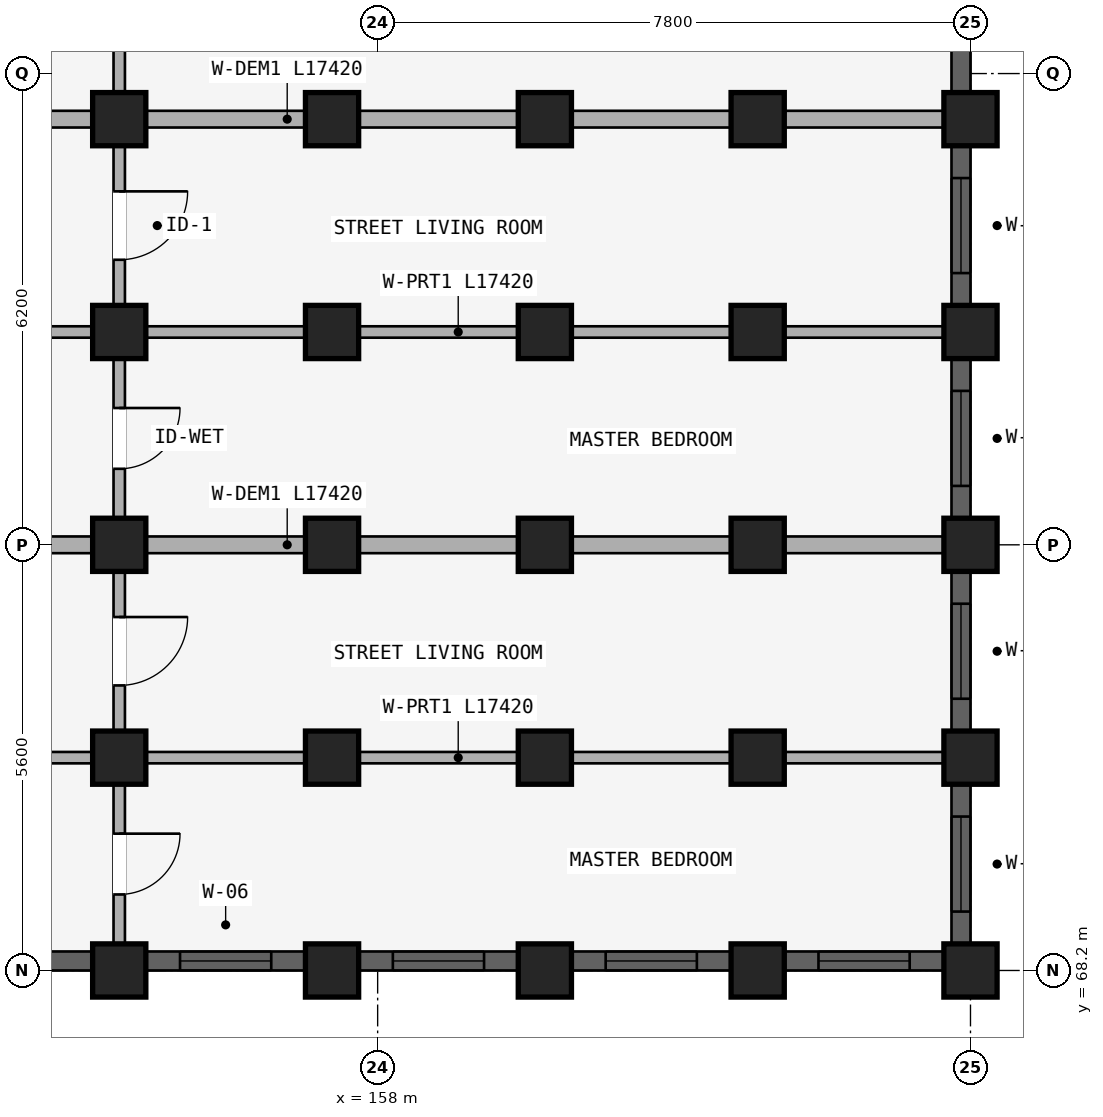
"""IFC4 building model, lengths in metres.
Left out: names, types, materials, properties, quantities, classifications, styles, units other than length and angle.
Written with IfcOpenShell. Run it as: python <this file> out.ifc"""

import sys

from ifc_helpers import new_model, si_unit, direction, frame, frame_2d, origin, origin_2d, place, context, subcontext, project, spatial, rectangle, extrude, element, fill, save


model = new_model("IFC4")
c1 = context("Model", 3, precision=1e-05, world=origin(), true_north=direction((0.0, 1.0)))
c2 = subcontext(c1, "Body", "Model", "MODEL_VIEW")
j1 = project(units=[si_unit("LENGTHUNIT", "METRE"), si_unit("PLANEANGLEUNIT", "RADIAN")], contexts=[c1])
p1 = place(None, origin())
s1 = spatial("IfcSite", under=j1, at=p1, CompositionType="ELEMENT")
p2 = place(p1, origin())
s2 = spatial("IfcBuilding", under=s1, at=p2, CompositionType="ELEMENT")
p3 = place(p2, frame((0.0, 0.0, 24.45)))
s3 = spatial("IfcBuildingStorey", under=s2, at=p3, CompositionType="ELEMENT", Elevation=24.45)
for number, where, z_axis, x_axis in (
    (1, (154.6, 79.4, 0.0), (0.0, 0.0, 1.0), (1.0, 0.0, 0.0)),
    (2, (157.4, 79.4, 0.0), (0.0, 0.0, 1.0), (1.0, 0.0, 0.0)),
    (3, (160.2, 79.4, 0.0), (0.0, 0.0, 1.0), (1.0, 0.0, 0.0)),
    (4, (163.0, 79.4, 0.0), (0.0, 0.0, 1.0), (1.0, 0.0, 0.0)),
    (5, (165.8, 79.4, 0.0), (0.0, 0.0, 1.0), (1.0, 0.0, 0.0)),
    (6, (154.6, 76.6, 0.0), (0.0, 0.0, 1.0), (1.0, 0.0, 0.0)),
    (7, (157.4, 76.6, 0.0), (0.0, 0.0, 1.0), (1.0, 0.0, 0.0)),
    (8, (160.2, 76.6, 0.0), (0.0, 0.0, 1.0), (1.0, 0.0, 0.0)),
    (9, (163.0, 76.6, 0.0), (0.0, 0.0, 1.0), (1.0, 0.0, 0.0)),
    (10, (165.8, 76.6, 0.0), (0.0, 0.0, 1.0), (1.0, 0.0, 0.0)),
    (11, (154.6, 73.8, 0.0), (0.0, 0.0, 1.0), (1.0, 0.0, 0.0)),
    (12, (157.4, 73.8, 0.0), (0.0, 0.0, 1.0), (1.0, 0.0, 0.0)),
    (13, (160.2, 73.8, 0.0), (0.0, 0.0, 1.0), (1.0, 0.0, 0.0)),
    (14, (163.0, 73.8, 0.0), (0.0, 0.0, 1.0), (1.0, 0.0, 0.0)),
    (15, (165.8, 73.8, 0.0), (0.0, 0.0, 1.0), (1.0, 0.0, 0.0)),
    (16, (154.6, 71.0, 0.0), (0.0, 0.0, 1.0), (1.0, 0.0, 0.0)),
    (17, (157.4, 71.0, 0.0), (0.0, 0.0, 1.0), (1.0, 0.0, 0.0)),
    (18, (160.2, 71.0, 0.0), (0.0, 0.0, 1.0), (1.0, 0.0, 0.0)),
    (19, (163.0, 71.0, 0.0), (0.0, 0.0, 1.0), (1.0, 0.0, 0.0)),
    (20, (165.8, 71.0, 0.0), (0.0, 0.0, 1.0), (1.0, 0.0, 0.0)),
):
    element("IfcColumn", number, at=place(p3, frame(where, z_axis=z_axis, x_axis=x_axis)), inside=s3, PredefinedType="COLUMN", context=c2, shape_type="SweptSolid", body=[
        extrude(rectangle(XDim=0.7, YDim=0.7, at=origin_2d()), origin(), (0.0, 0.0, 1.0), 2.93),
    ])
for number, where, z_axis, x_axis in (
    (21, (154.6, 68.2, 0.0), (0.0, 0.0, 1.0), (1.0, 0.0, 0.0)),
    (22, (157.4, 68.2, 0.0), (0.0, 0.0, 1.0), (1.0, 0.0, 0.0)),
    (23, (160.2, 68.2, 0.0), (0.0, 0.0, 1.0), (1.0, 0.0, 0.0)),
    (24, (163.0, 68.2, 0.0), (0.0, 0.0, 1.0), (1.0, 0.0, 0.0)),
    (25, (165.8, 68.2, 0.0), (0.0, 0.0, 1.0), (1.0, 0.0, 0.0)),
):
    element("IfcColumn", number, at=place(p3, frame(where, z_axis=z_axis, x_axis=x_axis)), inside=s3, PredefinedType="COLUMN", context=c2, shape_type="SweptSolid", body=[
        extrude(rectangle(XDim=0.7, YDim=0.7, at=origin_2d()), origin(), (0.0, 0.0, 1.0), 2.97),
    ])
p4 = place(p3, frame((154.6, 83.52, 0.0), z_axis=(0.0, 0.0, 1.0), x_axis=(0.0, -1.0, 0.0)))
e26 = element("IfcWall", 26, at=p4, inside=s3, PredefinedType="PARTITIONING", context=c2, shape_type="SweptSolid", body=[
    extrude(rectangle(XDim=4.04, YDim=0.15, at=frame_2d((2.02, 0.0))), origin(), (0.0, 0.0, 1.0), 2.372),
])
p5 = place(p4, frame((1.57, 0.0, 0.0)))
e27 = element("IfcOpeningElement", 27, at=p5, cuts=e26, PredefinedType="OPENING", context=c2, shape_type="SweptSolid", body=[
    extrude(rectangle(XDim=0.9, YDim=2.1, at=frame_2d((0.45, 1.05))), frame((0.0, 0.085, 0.0), z_axis=(0.0, -1.0, 0.0), x_axis=(1.0, 0.0, 0.0)), (0.0, 0.0, 1.0), 0.17),
])
p6 = place(p3, frame((154.6, 79.32, 0.0), z_axis=(0.0, 0.0, 1.0), x_axis=(0.0, -1.0, 0.0)))
e28 = element("IfcWall", 28, at=p6, inside=s3, PredefinedType="PLUMBINGWALL", context=c2, shape_type="SweptSolid", body=[
    extrude(rectangle(XDim=2.64, YDim=0.15, at=frame_2d((1.32, 0.0))), origin(), (0.0, 0.0, 1.0), 2.372),
])
p7 = place(p6, frame((0.87, 0.0, 0.0)))
e29 = element("IfcOpeningElement", 29, at=p7, cuts=e28, PredefinedType="OPENING", context=c2, shape_type="SweptSolid", body=[
    extrude(rectangle(XDim=0.9, YDim=2.1, at=frame_2d((0.45, 1.05))), frame((0.0, 0.085, 0.0), z_axis=(0.0, -1.0, 0.0), x_axis=(1.0, 0.0, 0.0)), (0.0, 0.0, 1.0), 0.17),
])
p8 = place(p3, frame((148.1, 79.4, 0.0), z_axis=(0.0, 0.0, 1.0), x_axis=(1.0, 0.0, 0.0)))
e30 = element("IfcWall", 30, at=p8, inside=s3, PredefinedType="STANDARD", context=c2, shape_type="SweptSolid", body=[
    extrude(rectangle(XDim=17.42, YDim=0.22, at=frame_2d((8.71, 0.0))), origin(), (0.0, 0.0, 1.0), 2.372),
])
p9 = place(p3, frame((154.6, 76.52, 0.0), z_axis=(0.0, 0.0, 1.0), x_axis=(0.0, -1.0, 0.0)))
e31 = element("IfcWall", 31, at=p9, inside=s3, PredefinedType="PLUMBINGWALL", context=c2, shape_type="SweptSolid", body=[
    extrude(rectangle(XDim=2.64, YDim=0.15, at=frame_2d((1.32, 0.0))), origin(), (0.0, 0.0, 1.0), 2.372),
])
p10 = place(p9, frame((0.92, 0.0, 0.0)))
e32 = element("IfcOpeningElement", 32, at=p10, cuts=e31, PredefinedType="OPENING", context=c2, shape_type="SweptSolid", body=[
    extrude(rectangle(XDim=0.8, YDim=2.1, at=frame_2d((0.4, 1.05))), frame((0.0, 0.085, 0.0), z_axis=(0.0, -1.0, 0.0), x_axis=(1.0, 0.0, 0.0)), (0.0, 0.0, 1.0), 0.17),
])
p11 = place(p3, frame((148.1, 76.6, 0.0), z_axis=(0.0, 0.0, 1.0), x_axis=(1.0, 0.0, 0.0)))
e33 = element("IfcWall", 33, at=p11, inside=s3, PredefinedType="PARTITIONING", context=c2, shape_type="SweptSolid", body=[
    extrude(rectangle(XDim=17.42, YDim=0.15, at=frame_2d((8.71, 0.0))), origin(), (0.0, 0.0, 1.0), 2.372),
])
p12 = place(p11, frame((2.75, 0.0, 0.0)))
e34 = element("IfcOpeningElement", 34, at=p12, cuts=e33, PredefinedType="OPENING", context=c2, shape_type="SweptSolid", body=[
    extrude(rectangle(XDim=0.9, YDim=2.1, at=frame_2d((0.45, 1.05))), frame((0.0, 0.085, 0.0), z_axis=(0.0, -1.0, 0.0), x_axis=(1.0, 0.0, 0.0)), (0.0, 0.0, 1.0), 0.17),
])
p13 = place(p3, frame((154.6, 73.72, 0.0), z_axis=(0.0, 0.0, 1.0), x_axis=(0.0, -1.0, 0.0)))
e35 = element("IfcWall", 35, at=p13, inside=s3, PredefinedType="PLUMBINGWALL", context=c2, shape_type="SweptSolid", body=[
    extrude(rectangle(XDim=2.64, YDim=0.15, at=frame_2d((1.32, 0.0))), origin(), (0.0, 0.0, 1.0), 2.372),
])
p14 = place(p13, frame((0.87, 0.0, 0.0)))
e36 = element("IfcOpeningElement", 36, at=p14, cuts=e35, PredefinedType="OPENING", context=c2, shape_type="SweptSolid", body=[
    extrude(rectangle(XDim=0.9, YDim=2.1, at=frame_2d((0.45, 1.05))), frame((0.0, 0.085, 0.0), z_axis=(0.0, -1.0, 0.0), x_axis=(1.0, 0.0, 0.0)), (0.0, 0.0, 1.0), 0.17),
])
p15 = place(p3, frame((148.1, 73.8, 0.0), z_axis=(0.0, 0.0, 1.0), x_axis=(1.0, 0.0, 0.0)))
e37 = element("IfcWall", 37, at=p15, inside=s3, PredefinedType="STANDARD", context=c2, shape_type="SweptSolid", body=[
    extrude(rectangle(XDim=17.42, YDim=0.22, at=frame_2d((8.71, 0.0))), origin(), (0.0, 0.0, 1.0), 2.372),
])
p16 = place(p3, frame((154.6, 70.92, 0.0), z_axis=(0.0, 0.0, 1.0), x_axis=(0.0, -1.0, 0.0)))
e38 = element("IfcWall", 38, at=p16, inside=s3, PredefinedType="PLUMBINGWALL", context=c2, shape_type="SweptSolid", body=[
    extrude(rectangle(XDim=2.64, YDim=0.15, at=frame_2d((1.32, 0.0))), origin(), (0.0, 0.0, 1.0), 2.372),
])
p17 = place(p16, frame((0.92, 0.0, 0.0)))
e39 = element("IfcOpeningElement", 39, at=p17, cuts=e38, PredefinedType="OPENING", context=c2, shape_type="SweptSolid", body=[
    extrude(rectangle(XDim=0.8, YDim=2.1, at=frame_2d((0.4, 1.05))), frame((0.0, 0.085, 0.0), z_axis=(0.0, -1.0, 0.0), x_axis=(1.0, 0.0, 0.0)), (0.0, 0.0, 1.0), 0.17),
])
p18 = place(p3, frame((148.1, 71.0, 0.0), z_axis=(0.0, 0.0, 1.0), x_axis=(1.0, 0.0, 0.0)))
e40 = element("IfcWall", 40, at=p18, inside=s3, PredefinedType="PARTITIONING", context=c2, shape_type="SweptSolid", body=[
    extrude(rectangle(XDim=17.42, YDim=0.15, at=frame_2d((8.71, 0.0))), origin(), (0.0, 0.0, 1.0), 2.372),
])
p19 = place(p18, frame((2.75, 0.0, 0.0)))
e41 = element("IfcOpeningElement", 41, at=p19, cuts=e40, PredefinedType="OPENING", context=c2, shape_type="SweptSolid", body=[
    extrude(rectangle(XDim=0.9, YDim=2.1, at=frame_2d((0.45, 1.05))), frame((0.0, 0.085, 0.0), z_axis=(0.0, -1.0, 0.0), x_axis=(1.0, 0.0, 0.0)), (0.0, 0.0, 1.0), 0.17),
])
p20 = place(p3, frame((165.675, 83.247, 0.0), z_axis=(0.0, 0.0, 1.0), x_axis=(0.0, -1.0, 0.0)))
e42 = element("IfcWall", 42, at=p20, inside=s3, PredefinedType="STANDARD", context=c2, shape_type="SweptSolid", body=[
    extrude(rectangle(XDim=3.493, YDim=0.25, at=frame_2d((1.747, 0.0))), origin(), (0.0, 0.0, 1.0), 2.472),
])
p21 = place(p20, frame((1.122, 0.0, 0.722)))
e43 = element("IfcOpeningElement", 43, at=p21, cuts=e42, PredefinedType="OPENING", context=c2, shape_type="SweptSolid", body=[
    extrude(rectangle(XDim=1.25, YDim=1.55, at=frame_2d((0.625, 0.775))), frame((0.0, 0.135, 0.0), z_axis=(0.0, -1.0, 0.0), x_axis=(1.0, 0.0, 0.0)), (0.0, 0.0, 1.0), 0.27),
])
p22 = place(p3, frame((165.675, 79.046, 0.0), z_axis=(0.0, 0.0, 1.0), x_axis=(0.0, -1.0, 0.0)))
e44 = element("IfcWall", 44, at=p22, inside=s3, PredefinedType="STANDARD", context=c2, shape_type="SweptSolid", body=[
    extrude(rectangle(XDim=2.093, YDim=0.25, at=frame_2d((1.046, 0.0))), origin(), (0.0, 0.0, 1.0), 2.472),
])
p23 = place(p22, frame((0.421, 0.0, 0.722)))
e45 = element("IfcOpeningElement", 45, at=p23, cuts=e44, PredefinedType="OPENING", context=c2, shape_type="SweptSolid", body=[
    extrude(rectangle(XDim=1.25, YDim=1.55, at=frame_2d((0.625, 0.775))), frame((0.0, 0.135, 0.0), z_axis=(0.0, -1.0, 0.0), x_axis=(1.0, 0.0, 0.0)), (0.0, 0.0, 1.0), 0.27),
])
p24 = place(p3, frame((165.675, 76.247, 0.0), z_axis=(0.0, 0.0, 1.0), x_axis=(0.0, -1.0, 0.0)))
e46 = element("IfcWall", 46, at=p24, inside=s3, PredefinedType="STANDARD", context=c2, shape_type="SweptSolid", body=[
    extrude(rectangle(XDim=2.093, YDim=0.25, at=frame_2d((1.046, 0.0))), origin(), (0.0, 0.0, 1.0), 2.472),
])
p25 = place(p24, frame((0.421, 0.0, 0.722)))
e47 = element("IfcOpeningElement", 47, at=p25, cuts=e46, PredefinedType="OPENING", context=c2, shape_type="SweptSolid", body=[
    extrude(rectangle(XDim=1.25, YDim=1.55, at=frame_2d((0.625, 0.775))), frame((0.0, 0.135, 0.0), z_axis=(0.0, -1.0, 0.0), x_axis=(1.0, 0.0, 0.0)), (0.0, 0.0, 1.0), 0.27),
])
p26 = place(p3, frame((165.675, 73.447, 0.0), z_axis=(0.0, 0.0, 1.0), x_axis=(0.0, -1.0, 0.0)))
e48 = element("IfcWall", 48, at=p26, inside=s3, PredefinedType="STANDARD", context=c2, shape_type="SweptSolid", body=[
    extrude(rectangle(XDim=2.093, YDim=0.25, at=frame_2d((1.046, 0.0))), origin(), (0.0, 0.0, 1.0), 2.472),
])
p27 = place(p26, frame((0.421, 0.0, 0.722)))
e49 = element("IfcOpeningElement", 49, at=p27, cuts=e48, PredefinedType="OPENING", context=c2, shape_type="SweptSolid", body=[
    extrude(rectangle(XDim=1.25, YDim=1.55, at=frame_2d((0.625, 0.775))), frame((0.0, 0.135, 0.0), z_axis=(0.0, -1.0, 0.0), x_axis=(1.0, 0.0, 0.0)), (0.0, 0.0, 1.0), 0.27),
])
p28 = place(p3, frame((165.675, 70.646, 0.0), z_axis=(0.0, 0.0, 1.0), x_axis=(0.0, -1.0, 0.0)))
e50 = element("IfcWall", 50, at=p28, inside=s3, PredefinedType="STANDARD", context=c2, shape_type="SweptSolid", body=[
    extrude(rectangle(XDim=2.093, YDim=0.25, at=frame_2d((1.046, 0.0))), origin(), (0.0, 0.0, 1.0), 2.472),
])
p29 = place(p28, frame((0.421, 0.0, 0.722)))
e51 = element("IfcOpeningElement", 51, at=p29, cuts=e50, PredefinedType="OPENING", context=c2, shape_type="SweptSolid", body=[
    extrude(rectangle(XDim=1.25, YDim=1.55, at=frame_2d((0.625, 0.775))), frame((0.0, 0.135, 0.0), z_axis=(0.0, -1.0, 0.0), x_axis=(1.0, 0.0, 0.0)), (0.0, 0.0, 1.0), 0.27),
])
p30 = place(p3, frame((148.229, 68.325, 0.0), z_axis=(0.0, 0.0, 1.0), x_axis=(1.0, 0.0, 0.0)))
e52 = element("IfcWall", 52, at=p30, inside=s3, PredefinedType="STANDARD", context=c2, shape_type="SweptSolid", body=[
    extrude(rectangle(XDim=6.018, YDim=0.25, at=frame_2d((3.009, 0.0))), origin(), (0.0, 0.0, 1.0), 2.372),
])
p31 = place(p30, frame((2.322, 0.0, 0.522)))
e53 = element("IfcOpeningElement", 53, at=p31, cuts=e52, PredefinedType="OPENING", context=c2, shape_type="SweptSolid", body=[
    extrude(rectangle(XDim=1.5, YDim=1.65, at=frame_2d((0.75, 0.825))), frame((0.0, 0.135, 0.0), z_axis=(0.0, -1.0, 0.0), x_axis=(1.0, 0.0, 0.0)), (0.0, 0.0, 1.0), 0.27),
])
p32 = place(p3, frame((154.954, 68.325, 0.0), z_axis=(0.0, 0.0, 1.0), x_axis=(1.0, 0.0, 0.0)))
e54 = element("IfcWall", 54, at=p32, inside=s3, PredefinedType="STANDARD", context=c2, shape_type="SweptSolid", body=[
    extrude(rectangle(XDim=2.093, YDim=0.25, at=frame_2d((1.046, 0.0))), origin(), (0.0, 0.0, 1.0), 2.372),
])
p33 = place(p32, frame((0.447, 0.0, 0.672)))
e55 = element("IfcOpeningElement", 55, at=p33, cuts=e54, PredefinedType="OPENING", context=c2, shape_type="SweptSolid", body=[
    extrude(rectangle(XDim=1.2, YDim=1.5, at=frame_2d((0.6, 0.75))), frame((0.0, 0.135, 0.0), z_axis=(0.0, -1.0, 0.0), x_axis=(1.0, 0.0, 0.0)), (0.0, 0.0, 1.0), 0.27),
])
p34 = place(p3, frame((157.753, 68.325, 0.0), z_axis=(0.0, 0.0, 1.0), x_axis=(1.0, 0.0, 0.0)))
e56 = element("IfcWall", 56, at=p34, inside=s3, PredefinedType="STANDARD", context=c2, shape_type="SweptSolid", body=[
    extrude(rectangle(XDim=2.093, YDim=0.25, at=frame_2d((1.046, 0.0))), origin(), (0.0, 0.0, 1.0), 2.372),
])
p35 = place(p34, frame((0.447, 0.0, 0.672)))
e57 = element("IfcOpeningElement", 57, at=p35, cuts=e56, PredefinedType="OPENING", context=c2, shape_type="SweptSolid", body=[
    extrude(rectangle(XDim=1.2, YDim=1.5, at=frame_2d((0.6, 0.75))), frame((0.0, 0.135, 0.0), z_axis=(0.0, -1.0, 0.0), x_axis=(1.0, 0.0, 0.0)), (0.0, 0.0, 1.0), 0.27),
])
p36 = place(p3, frame((160.553, 68.325, 0.0), z_axis=(0.0, 0.0, 1.0), x_axis=(1.0, 0.0, 0.0)))
e58 = element("IfcWall", 58, at=p36, inside=s3, PredefinedType="STANDARD", context=c2, shape_type="SweptSolid", body=[
    extrude(rectangle(XDim=2.093, YDim=0.25, at=frame_2d((1.046, 0.0))), origin(), (0.0, 0.0, 1.0), 2.372),
])
p37 = place(p36, frame((0.447, 0.0, 0.672)))
e59 = element("IfcOpeningElement", 59, at=p37, cuts=e58, PredefinedType="OPENING", context=c2, shape_type="SweptSolid", body=[
    extrude(rectangle(XDim=1.2, YDim=1.5, at=frame_2d((0.6, 0.75))), frame((0.0, 0.135, 0.0), z_axis=(0.0, -1.0, 0.0), x_axis=(1.0, 0.0, 0.0)), (0.0, 0.0, 1.0), 0.27),
])
p38 = place(p3, frame((163.354, 68.325, 0.0), z_axis=(0.0, 0.0, 1.0), x_axis=(1.0, 0.0, 0.0)))
e60 = element("IfcWall", 60, at=p38, inside=s3, PredefinedType="STANDARD", context=c2, shape_type="SweptSolid", body=[
    extrude(rectangle(XDim=2.093, YDim=0.25, at=frame_2d((1.046, 0.0))), origin(), (0.0, 0.0, 1.0), 2.372),
])
p39 = place(p38, frame((0.447, 0.0, 0.672)))
e61 = element("IfcOpeningElement", 61, at=p39, cuts=e60, PredefinedType="OPENING", context=c2, shape_type="SweptSolid", body=[
    extrude(rectangle(XDim=1.2, YDim=1.5, at=frame_2d((0.6, 0.75))), frame((0.0, 0.135, 0.0), z_axis=(0.0, -1.0, 0.0), x_axis=(1.0, 0.0, 0.0)), (0.0, 0.0, 1.0), 0.27),
])
p40 = place(p23, origin())
e62 = element("IfcWindow", 62, at=p40, inside=s3, PartitioningType="SINGLE_PANEL", PredefinedType="WINDOW", context=c2, shape_type="SweptSolid", body=[
    extrude(rectangle(XDim=1.25, YDim=1.55, at=frame_2d((0.625, 0.775))), frame((0.0, 0.03, 0.0), z_axis=(0.0, -1.0, 0.0), x_axis=(1.0, 0.0, 0.0)), (0.0, 0.0, 1.0), 0.06),
])
fill(e45, e62)
p41 = place(p25, origin())
e63 = element("IfcWindow", 63, at=p41, inside=s3, PartitioningType="SINGLE_PANEL", PredefinedType="WINDOW", context=c2, shape_type="SweptSolid", body=[
    extrude(rectangle(XDim=1.25, YDim=1.55, at=frame_2d((0.625, 0.775))), frame((0.0, 0.03, 0.0), z_axis=(0.0, -1.0, 0.0), x_axis=(1.0, 0.0, 0.0)), (0.0, 0.0, 1.0), 0.06),
])
fill(e47, e63)
p42 = place(p27, origin())
e64 = element("IfcWindow", 64, at=p42, inside=s3, PartitioningType="SINGLE_PANEL", PredefinedType="WINDOW", context=c2, shape_type="SweptSolid", body=[
    extrude(rectangle(XDim=1.25, YDim=1.55, at=frame_2d((0.625, 0.775))), frame((0.0, 0.03, 0.0), z_axis=(0.0, -1.0, 0.0), x_axis=(1.0, 0.0, 0.0)), (0.0, 0.0, 1.0), 0.06),
])
fill(e49, e64)
p43 = place(p29, origin())
e65 = element("IfcWindow", 65, at=p43, inside=s3, PartitioningType="SINGLE_PANEL", PredefinedType="WINDOW", context=c2, shape_type="SweptSolid", body=[
    extrude(rectangle(XDim=1.25, YDim=1.55, at=frame_2d((0.625, 0.775))), frame((0.0, 0.03, 0.0), z_axis=(0.0, -1.0, 0.0), x_axis=(1.0, 0.0, 0.0)), (0.0, 0.0, 1.0), 0.06),
])
fill(e51, e65)
p44 = place(p33, origin())
e66 = element("IfcWindow", 66, at=p44, inside=s3, PartitioningType="SINGLE_PANEL", PredefinedType="WINDOW", context=c2, shape_type="SweptSolid", body=[
    extrude(rectangle(XDim=1.2, YDim=1.5, at=frame_2d((0.6, 0.75))), frame((0.0, 0.03, 0.0), z_axis=(0.0, -1.0, 0.0), x_axis=(1.0, 0.0, 0.0)), (0.0, 0.0, 1.0), 0.06),
])
fill(e55, e66)
p45 = place(p35, origin())
e67 = element("IfcWindow", 67, at=p45, inside=s3, PartitioningType="SINGLE_PANEL", PredefinedType="WINDOW", context=c2, shape_type="SweptSolid", body=[
    extrude(rectangle(XDim=1.2, YDim=1.5, at=frame_2d((0.6, 0.75))), frame((0.0, 0.03, 0.0), z_axis=(0.0, -1.0, 0.0), x_axis=(1.0, 0.0, 0.0)), (0.0, 0.0, 1.0), 0.06),
])
fill(e57, e67)
p46 = place(p37, origin())
e68 = element("IfcWindow", 68, at=p46, inside=s3, PartitioningType="SINGLE_PANEL", PredefinedType="WINDOW", context=c2, shape_type="SweptSolid", body=[
    extrude(rectangle(XDim=1.2, YDim=1.5, at=frame_2d((0.6, 0.75))), frame((0.0, 0.03, 0.0), z_axis=(0.0, -1.0, 0.0), x_axis=(1.0, 0.0, 0.0)), (0.0, 0.0, 1.0), 0.06),
])
fill(e59, e68)
p47 = place(p39, origin())
e69 = element("IfcWindow", 69, at=p47, inside=s3, PartitioningType="SINGLE_PANEL", PredefinedType="WINDOW", context=c2, shape_type="SweptSolid", body=[
    extrude(rectangle(XDim=1.2, YDim=1.5, at=frame_2d((0.6, 0.75))), frame((0.0, 0.03, 0.0), z_axis=(0.0, -1.0, 0.0), x_axis=(1.0, 0.0, 0.0)), (0.0, 0.0, 1.0), 0.06),
])
fill(e61, e69)
p48 = place(p7, frame((0.9, 0.0, 0.0), z_axis=(0.0, 0.0, 1.0), x_axis=(-1.0, 0.0, 0.0)))
e70 = element("IfcDoor", 70, at=p48, inside=s3, OperationType="SINGLE_SWING_RIGHT", PredefinedType="DOOR", context=c2, shape_type="SweptSolid", body=[
    extrude(rectangle(XDim=0.9, YDim=2.1, at=frame_2d((0.45, 1.05))), frame((0.0, 0.025, 0.0), z_axis=(0.0, -1.0, 0.0), x_axis=(1.0, 0.0, 0.0)), (0.0, 0.0, 1.0), 0.05),
])
fill(e29, e70)
p49 = place(p10, frame((0.8, 0.0, 0.0), z_axis=(0.0, 0.0, 1.0), x_axis=(-1.0, 0.0, 0.0)))
e71 = element("IfcDoor", 71, at=p49, inside=s3, OperationType="SINGLE_SWING_RIGHT", PredefinedType="DOOR", context=c2, shape_type="SweptSolid", body=[
    extrude(rectangle(XDim=0.8, YDim=2.1, at=frame_2d((0.4, 1.05))), frame((0.0, 0.025, 0.0), z_axis=(0.0, -1.0, 0.0), x_axis=(1.0, 0.0, 0.0)), (0.0, 0.0, 1.0), 0.05),
])
fill(e32, e71)
p50 = place(p14, frame((0.9, 0.0, 0.0), z_axis=(0.0, 0.0, 1.0), x_axis=(-1.0, 0.0, 0.0)))
e72 = element("IfcDoor", 72, at=p50, inside=s3, OperationType="SINGLE_SWING_RIGHT", PredefinedType="DOOR", context=c2, shape_type="SweptSolid", body=[
    extrude(rectangle(XDim=0.9, YDim=2.1, at=frame_2d((0.45, 1.05))), frame((0.0, 0.025, 0.0), z_axis=(0.0, -1.0, 0.0), x_axis=(1.0, 0.0, 0.0)), (0.0, 0.0, 1.0), 0.05),
])
fill(e36, e72)
p51 = place(p17, frame((0.8, 0.0, 0.0), z_axis=(0.0, 0.0, 1.0), x_axis=(-1.0, 0.0, 0.0)))
e73 = element("IfcDoor", 73, at=p51, inside=s3, OperationType="SINGLE_SWING_RIGHT", PredefinedType="DOOR", context=c2, shape_type="SweptSolid", body=[
    extrude(rectangle(XDim=0.8, YDim=2.1, at=frame_2d((0.4, 1.05))), frame((0.0, 0.025, 0.0), z_axis=(0.0, -1.0, 0.0), x_axis=(1.0, 0.0, 0.0)), (0.0, 0.0, 1.0), 0.05),
])
fill(e39, e73)
save(model, sys.argv[1])
